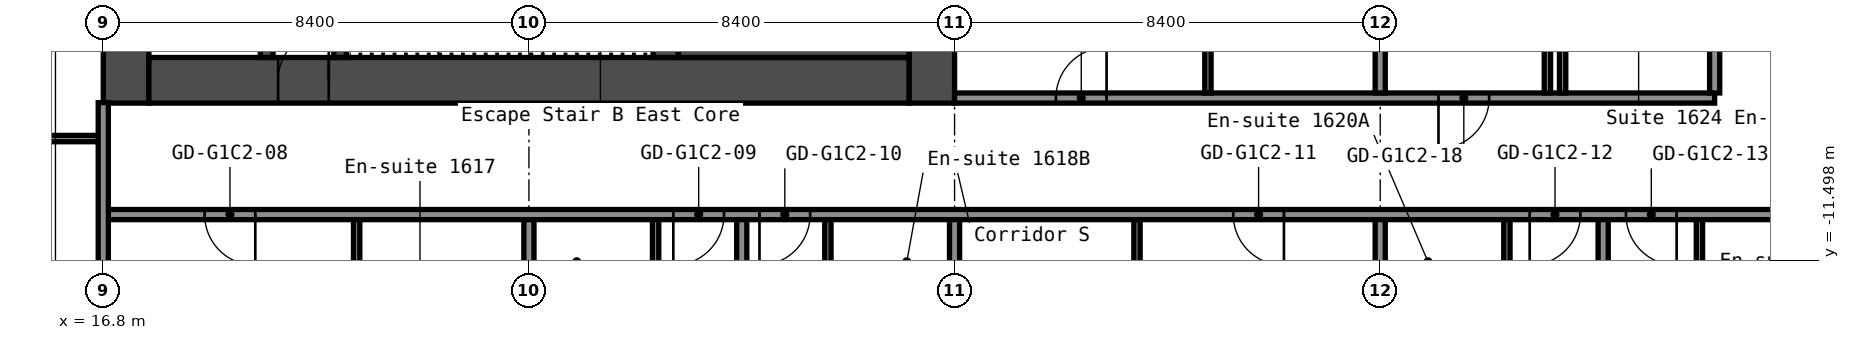
"""IFC4 building model, lengths in metres.
Left out: names, types, materials, properties, quantities, classifications, styles, units other than length and angle.
Written with IfcOpenShell. Run it as: python <this file> out.ifc"""

import sys

from ifc_helpers import new_model, si_unit, direction, frame, frame_2d, origin, place, context, subcontext, project, spatial, rectangle, extrude, element, fill, save


model = new_model("IFC4")
c1 = context("Model", 3, precision=1e-05, world=origin(), true_north=direction((0.0, 1.0)))
c2 = subcontext(c1, "Body", "Model", "MODEL_VIEW")
j1 = project(units=[si_unit("LENGTHUNIT", "METRE"), si_unit("PLANEANGLEUNIT", "RADIAN")], contexts=[c1])
p1 = place(None, origin())
s1 = spatial("IfcSite", under=j1, at=p1, CompositionType="ELEMENT")
p2 = place(p1, origin())
s2 = spatial("IfcBuilding", under=s1, at=p2, CompositionType="ELEMENT")
p3 = place(p2, frame((0.0, 0.0, 58.2)))
s3 = spatial("IfcBuildingStorey", under=s2, at=p3, CompositionType="ELEMENT", Elevation=58.2)
p4 = place(p3, frame((17.25, -8.4, 0.0), z_axis=(0.0, 0.0, 1.0), x_axis=(0.0, 1.0, 0.0)))
e1 = element("IfcWall", 1, at=p4, inside=s3, PredefinedType="SHEAR", context=c2, shape_type="SweptSolid", body=[
    extrude(rectangle(XDim=16.8, YDim=0.9, at=frame_2d((8.4, 0.0))), origin(), (0.0, 0.0, 1.0), 2.8),
])
p5 = place(p4, frame((12.75, 0.0, 0.0)))
e2 = element("IfcOpeningElement", 2, at=p5, cuts=e1, PredefinedType="OPENING", context=c2, shape_type="SweptSolid", body=[
    extrude(rectangle(XDim=1.2, YDim=2.1, at=frame_2d((0.6, 1.05))), frame((0.0, 0.46, 0.0), z_axis=(0.0, -1.0, 0.0), x_axis=(1.0, 0.0, 0.0)), (0.0, 0.0, 1.0), 0.92),
])
p6 = place(p4, frame((2.85, 0.0, 0.0)))
e3 = element("IfcOpeningElement", 3, at=p6, cuts=e1, PredefinedType="OPENING", context=c2, shape_type="SweptSolid", body=[
    extrude(rectangle(XDim=1.2, YDim=2.1, at=frame_2d((0.6, 1.05))), frame((0.0, 0.46, 0.0), z_axis=(0.0, -1.0, 0.0), x_axis=(1.0, 0.0, 0.0)), (0.0, 0.0, 1.0), 0.92),
])
p7 = place(p3, frame((33.15, -8.4, 0.0), z_axis=(0.0, 0.0, 1.0), x_axis=(0.0, 1.0, 0.0)))
e4 = element("IfcWall", 4, at=p7, inside=s3, PredefinedType="SHEAR", context=c2, shape_type="SweptSolid", body=[
    extrude(rectangle(XDim=16.8, YDim=0.9, at=frame_2d((8.4, 0.0))), origin(), (0.0, 0.0, 1.0), 2.8),
])
p8 = place(p3, frame((17.7, -7.95, 0.0), z_axis=(0.0, 0.0, 1.0), x_axis=(1.0, 0.0, 0.0)))
e5 = element("IfcWall", 5, at=p8, inside=s3, PredefinedType="SHEAR", context=c2, shape_type="SweptSolid", body=[
    extrude(rectangle(XDim=15.0, YDim=0.9, at=frame_2d((7.5, 0.0))), origin(), (0.0, 0.0, 1.0), 2.8),
])
p9 = place(p8, frame((2.55, 0.0, 0.0)))
e6 = element("IfcOpeningElement", 6, at=p9, cuts=e5, PredefinedType="OPENING", context=c2, shape_type="SweptSolid", body=[
    extrude(rectangle(XDim=1.0, YDim=2.1, at=frame_2d((0.5, 1.05))), frame((0.0, 0.46, 0.0), z_axis=(0.0, -1.0, 0.0), x_axis=(1.0, 0.0, 0.0)), (0.0, 0.0, 1.0), 0.92),
])
p10 = place(p3, frame((20.025, -7.5, 0.0), z_axis=(0.0, 0.0, 1.0), x_axis=(0.0, 1.0, 0.0)))
e7 = element("IfcWall", 7, at=p10, inside=s3, PredefinedType="SHEAR", context=c2, shape_type="SweptSolid", body=[
    extrude(rectangle(XDim=6.3, YDim=0.25, at=frame_2d((3.15, 0.0))), origin(), (0.0, 0.0, 1.0), 2.8),
])
p11 = place(p10, frame((2.4, 0.0, 0.0)))
e8 = element("IfcOpeningElement", 8, at=p11, cuts=e7, PredefinedType="OPENING", context=c2, shape_type="SweptSolid", body=[
    extrude(rectangle(XDim=1.0, YDim=2.1, at=frame_2d((0.5, 1.05))), frame((0.0, 0.135, 0.0), z_axis=(0.0, -1.0, 0.0), x_axis=(1.0, 0.0, 0.0)), (0.0, 0.0, 1.0), 0.27),
])
p12 = place(p3, frame((21.475, -7.5, 0.0), z_axis=(0.0, 0.0, 1.0), x_axis=(0.0, 1.0, 0.0)))
e9 = element("IfcWall", 9, at=p12, inside=s3, PredefinedType="SHEAR", context=c2, shape_type="SweptSolid", body=[
    extrude(rectangle(XDim=3.75, YDim=0.25, at=frame_2d((1.875, 0.0))), origin(), (0.0, 0.0, 1.0), 2.8),
])
p13 = place(p12, frame((1.3, 0.0, 0.0)))
e10 = element("IfcOpeningElement", 10, at=p13, cuts=e9, PredefinedType="OPENING", context=c2, shape_type="SweptSolid", body=[
    extrude(rectangle(XDim=1.2, YDim=2.1, at=frame_2d((0.6, 1.05))), frame((0.0, 0.135, 0.0), z_axis=(0.0, -1.0, 0.0), x_axis=(1.0, 0.0, 0.0)), (0.0, 0.0, 1.0), 0.27),
])
p14 = place(p3, frame((27.9, -7.5, 0.0), z_axis=(0.0, 0.0, 1.0), x_axis=(0.0, 1.0, 0.0)))
e11 = element("IfcWall", 11, at=p14, inside=s3, PredefinedType="SHEAR", context=c2, shape_type="SweptSolid", body=[
    extrude(rectangle(XDim=3.75, YDim=0.5, at=frame_2d((1.875, 0.0))), origin(), (0.0, 0.0, 1.0), 2.8),
])
p15 = place(p3, frame((28.15, -6.75, 0.0), z_axis=(0.0, 0.0, 1.0), x_axis=(1.0, 0.0, 0.0)))
e12 = element("IfcWall", 12, at=p15, inside=s3, PredefinedType="SHEAR", context=c2, shape_type="SweptSolid", body=[
    extrude(rectangle(XDim=4.55, YDim=1.5, at=frame_2d((2.275, 0.0))), origin(), (0.0, 0.0, 1.0), 2.8),
])
p16 = place(p3, frame((16.8, -10.6, 0.0), z_axis=(0.0, 0.0, 1.0), x_axis=(1.0, 0.0, 0.0)))
e13 = element("IfcWall", 13, at=p16, inside=s3, PredefinedType="PARTITIONING", context=c2, shape_type="SweptSolid", body=[
    extrude(rectangle(XDim=34.3, YDim=0.2, at=frame_2d((17.15, 0.0))), origin(), (0.0, 0.0, 1.0), 2.8),
])
p17 = place(p16, frame((2.0, 0.0, 0.0)))
e14 = element("IfcOpeningElement", 14, at=p17, cuts=e13, PredefinedType="OPENING", context=c2, shape_type="SweptSolid", body=[
    extrude(rectangle(XDim=1.0, YDim=2.1, at=frame_2d((0.5, 1.05))), frame((0.0, 0.11, 0.0), z_axis=(0.0, -1.0, 0.0), x_axis=(1.0, 0.0, 0.0)), (0.0, 0.0, 1.0), 0.22),
])
p18 = place(p16, frame((11.25, 0.0, 0.0)))
e15 = element("IfcOpeningElement", 15, at=p18, cuts=e13, PredefinedType="OPENING", context=c2, shape_type="SweptSolid", body=[
    extrude(rectangle(XDim=1.0, YDim=2.1, at=frame_2d((0.5, 1.05))), frame((0.0, 0.11, 0.0), z_axis=(0.0, -1.0, 0.0), x_axis=(1.0, 0.0, 0.0)), (0.0, 0.0, 1.0), 0.22),
])
p19 = place(p16, frame((12.95, 0.0, 0.0)))
e16 = element("IfcOpeningElement", 16, at=p19, cuts=e13, PredefinedType="OPENING", context=c2, shape_type="SweptSolid", body=[
    extrude(rectangle(XDim=1.0, YDim=2.1, at=frame_2d((0.5, 1.05))), frame((0.0, 0.11, 0.0), z_axis=(0.0, -1.0, 0.0), x_axis=(1.0, 0.0, 0.0)), (0.0, 0.0, 1.0), 0.22),
])
p20 = place(p16, frame((22.3, 0.0, 0.0)))
e17 = element("IfcOpeningElement", 17, at=p20, cuts=e13, PredefinedType="OPENING", context=c2, shape_type="SweptSolid", body=[
    extrude(rectangle(XDim=1.0, YDim=2.1, at=frame_2d((0.5, 1.05))), frame((0.0, 0.11, 0.0), z_axis=(0.0, -1.0, 0.0), x_axis=(1.0, 0.0, 0.0)), (0.0, 0.0, 1.0), 0.22),
])
p21 = place(p16, frame((28.15, 0.0, 0.0)))
e18 = element("IfcOpeningElement", 18, at=p21, cuts=e13, PredefinedType="OPENING", context=c2, shape_type="SweptSolid", body=[
    extrude(rectangle(XDim=1.0, YDim=2.1, at=frame_2d((0.5, 1.05))), frame((0.0, 0.11, 0.0), z_axis=(0.0, -1.0, 0.0), x_axis=(1.0, 0.0, 0.0)), (0.0, 0.0, 1.0), 0.22),
])
p22 = place(p16, frame((30.05, 0.0, 0.0)))
e19 = element("IfcOpeningElement", 19, at=p22, cuts=e13, PredefinedType="OPENING", context=c2, shape_type="SweptSolid", body=[
    extrude(rectangle(XDim=1.0, YDim=2.1, at=frame_2d((0.5, 1.05))), frame((0.0, 0.11, 0.0), z_axis=(0.0, -1.0, 0.0), x_axis=(1.0, 0.0, 0.0)), (0.0, 0.0, 1.0), 0.22),
])
p23 = place(p3, frame((14.363, -9.1, 0.0), z_axis=(0.0, 0.0, 1.0), x_axis=(1.0, 0.0, 0.0)))
e20 = element("IfcWall", 20, at=p23, inside=s3, PredefinedType="PARTITIONING", context=c2, shape_type="SweptSolid", body=[
    extrude(rectangle(XDim=2.337, YDim=0.125, at=frame_2d((1.169, 0.0))), origin(), (0.0, 0.0, 1.0), 2.8),
])
p24 = place(p3, frame((33.6, -8.3, 0.0), z_axis=(0.0, 0.0, 1.0), x_axis=(1.0, 0.0, 0.0)))
e21 = element("IfcWall", 21, at=p24, inside=s3, PredefinedType="PARTITIONING", context=c2, shape_type="SweptSolid", body=[
    extrude(rectangle(XDim=15.0, YDim=0.2, at=frame_2d((7.5, 0.0))), origin(), (0.0, 0.0, 1.0), 2.8),
])
p25 = place(p24, frame((2.0, 0.0, 0.0)))
e22 = element("IfcOpeningElement", 22, at=p25, cuts=e21, PredefinedType="OPENING", context=c2, shape_type="SweptSolid", body=[
    extrude(rectangle(XDim=1.0, YDim=2.1, at=frame_2d((0.5, 1.05))), frame((0.0, 0.11, 0.0), z_axis=(0.0, -1.0, 0.0), x_axis=(1.0, 0.0, 0.0)), (0.0, 0.0, 1.0), 0.22),
])
p26 = place(p24, frame((9.55, 0.0, 0.0)))
e23 = element("IfcOpeningElement", 23, at=p26, cuts=e21, PredefinedType="OPENING", context=c2, shape_type="SweptSolid", body=[
    extrude(rectangle(XDim=1.0, YDim=2.1, at=frame_2d((0.5, 1.05))), frame((0.0, 0.11, 0.0), z_axis=(0.0, -1.0, 0.0), x_axis=(1.0, 0.0, 0.0)), (0.0, 0.0, 1.0), 0.22),
])
p27 = place(p3, frame((16.8, -20.3, 0.0), z_axis=(0.0, 0.0, 1.0), x_axis=(0.0, 1.0, 0.0)))
e24 = element("IfcWall", 24, at=p27, inside=s3, PredefinedType="PARTITIONING", context=c2, shape_type="SweptSolid", body=[
    extrude(rectangle(XDim=11.91, YDim=0.2, at=frame_2d((5.955, 0.0))), origin(), (0.0, 0.0, 1.0), 2.8),
])
p28 = place(p3, frame((21.8, -14.0, 0.0), z_axis=(0.0, 0.0, 1.0), x_axis=(0.0, 1.0, 0.0)))
e25 = element("IfcWall", 25, at=p28, inside=s3, PredefinedType="PARTITIONING", context=c2, shape_type="SweptSolid", body=[
    extrude(rectangle(XDim=3.3, YDim=0.125, at=frame_2d((1.65, 0.0))), origin(), (0.0, 0.0, 1.0), 2.8),
])
p29 = place(p3, frame((25.2, -20.3, 0.0), z_axis=(0.0, 0.0, 1.0), x_axis=(0.0, 1.0, 0.0)))
e26 = element("IfcWall", 26, at=p29, inside=s3, PredefinedType="PARTITIONING", context=c2, shape_type="SweptSolid", body=[
    extrude(rectangle(XDim=9.6, YDim=0.2, at=frame_2d((4.8, 0.0))), origin(), (0.0, 0.0, 1.0), 2.8),
])
p30 = place(p3, frame((27.7, -13.6, 0.0), z_axis=(0.0, 0.0, 1.0), x_axis=(0.0, 1.0, 0.0)))
e27 = element("IfcWall", 27, at=p30, inside=s3, PredefinedType="PARTITIONING", context=c2, shape_type="SweptSolid", body=[
    extrude(rectangle(XDim=2.9, YDim=0.125, at=frame_2d((1.45, 0.0))), origin(), (0.0, 0.0, 1.0), 2.8),
])
p31 = place(p30, frame((0.6, 0.0, 0.0)))
e28 = element("IfcOpeningElement", 28, at=p31, cuts=e27, PredefinedType="OPENING", context=c2, shape_type="SweptSolid", body=[
    extrude(rectangle(XDim=0.8, YDim=2.1, at=frame_2d((0.4, 1.05))), frame((0.0, 0.073, 0.0), z_axis=(0.0, -1.0, 0.0), x_axis=(1.0, 0.0, 0.0)), (0.0, 0.0, 1.0), 0.145),
])
p32 = place(p3, frame((29.4, -20.3, 0.0), z_axis=(0.0, 0.0, 1.0), x_axis=(0.0, 1.0, 0.0)))
e29 = element("IfcWall", 29, at=p32, inside=s3, PredefinedType="PARTITIONING", context=c2, shape_type="SweptSolid", body=[
    extrude(rectangle(XDim=9.6, YDim=0.2, at=frame_2d((4.8, 0.0))), origin(), (0.0, 0.0, 1.0), 2.8),
])
p33 = place(p3, frame((31.1, -13.6, 0.0), z_axis=(0.0, 0.0, 1.0), x_axis=(0.0, 1.0, 0.0)))
e30 = element("IfcWall", 30, at=p33, inside=s3, PredefinedType="PARTITIONING", context=c2, shape_type="SweptSolid", body=[
    extrude(rectangle(XDim=2.9, YDim=0.125, at=frame_2d((1.45, 0.0))), origin(), (0.0, 0.0, 1.0), 2.8),
])
p34 = place(p33, frame((0.6, 0.0, 0.0)))
e31 = element("IfcOpeningElement", 31, at=p34, cuts=e30, PredefinedType="OPENING", context=c2, shape_type="SweptSolid", body=[
    extrude(rectangle(XDim=0.8, YDim=2.1, at=frame_2d((0.4, 1.05))), frame((0.0, 0.073, 0.0), z_axis=(0.0, -1.0, 0.0), x_axis=(1.0, 0.0, 0.0)), (0.0, 0.0, 1.0), 0.145),
])
p35 = place(p3, frame((33.6, -20.3, 0.0), z_axis=(0.0, 0.0, 1.0), x_axis=(0.0, 1.0, 0.0)))
e32 = element("IfcWall", 32, at=p35, inside=s3, PredefinedType="PARTITIONING", context=c2, shape_type="SweptSolid", body=[
    extrude(rectangle(XDim=9.6, YDim=0.2, at=frame_2d((4.8, 0.0))), origin(), (0.0, 0.0, 1.0), 2.8),
])
p36 = place(p3, frame((37.2, -14.0, 0.0), z_axis=(0.0, 0.0, 1.0), x_axis=(0.0, 1.0, 0.0)))
e33 = element("IfcWall", 33, at=p36, inside=s3, PredefinedType="PARTITIONING", context=c2, shape_type="SweptSolid", body=[
    extrude(rectangle(XDim=3.3, YDim=0.125, at=frame_2d((1.65, 0.0))), origin(), (0.0, 0.0, 1.0), 2.8),
])
p37 = place(p36, frame((1.2, 0.0, 0.0)))
e34 = element("IfcOpeningElement", 34, at=p37, cuts=e33, PredefinedType="OPENING", context=c2, shape_type="SweptSolid", body=[
    extrude(rectangle(XDim=1.0, YDim=2.1, at=frame_2d((0.5, 1.05))), frame((0.0, 0.073, 0.0), z_axis=(0.0, -1.0, 0.0), x_axis=(1.0, 0.0, 0.0)), (0.0, 0.0, 1.0), 0.145),
])
p38 = place(p3, frame((38.6, -8.2, 0.0), z_axis=(0.0, 0.0, 1.0), x_axis=(0.0, 1.0, 0.0)))
e35 = element("IfcWall", 35, at=p38, inside=s3, PredefinedType="PARTITIONING", context=c2, shape_type="SweptSolid", body=[
    extrude(rectangle(XDim=3.3, YDim=0.125, at=frame_2d((1.65, 0.0))), origin(), (0.0, 0.0, 1.0), 2.8),
])
p39 = place(p3, frame((42.0, -20.3, 0.0), z_axis=(0.0, 0.0, 1.0), x_axis=(0.0, 1.0, 0.0)))
e36 = element("IfcWall", 36, at=p39, inside=s3, PredefinedType="PARTITIONING", context=c2, shape_type="SweptSolid", body=[
    extrude(rectangle(XDim=9.6, YDim=0.2, at=frame_2d((4.8, 0.0))), origin(), (0.0, 0.0, 1.0), 2.8),
])
p40 = place(p3, frame((42.0, -8.2, 0.0), z_axis=(0.0, 0.0, 1.0), x_axis=(0.0, 1.0, 0.0)))
e37 = element("IfcWall", 37, at=p40, inside=s3, PredefinedType="PARTITIONING", context=c2, shape_type="SweptSolid", body=[
    extrude(rectangle(XDim=16.4, YDim=0.2, at=frame_2d((8.2, 0.0))), origin(), (0.0, 0.0, 1.0), 2.8),
])
p41 = place(p3, frame((44.5, -13.6, 0.0), z_axis=(0.0, 0.0, 1.0), x_axis=(0.0, 1.0, 0.0)))
e38 = element("IfcWall", 38, at=p41, inside=s3, PredefinedType="PARTITIONING", context=c2, shape_type="SweptSolid", body=[
    extrude(rectangle(XDim=2.9, YDim=0.125, at=frame_2d((1.45, 0.0))), origin(), (0.0, 0.0, 1.0), 2.8),
])
p42 = place(p41, frame((0.6, 0.0, 0.0)))
e39 = element("IfcOpeningElement", 39, at=p42, cuts=e38, PredefinedType="OPENING", context=c2, shape_type="SweptSolid", body=[
    extrude(rectangle(XDim=0.8, YDim=2.1, at=frame_2d((0.4, 1.05))), frame((0.0, 0.073, 0.0), z_axis=(0.0, -1.0, 0.0), x_axis=(1.0, 0.0, 0.0)), (0.0, 0.0, 1.0), 0.145),
])
p43 = place(p3, frame((45.3, -8.2, 0.0), z_axis=(0.0, 0.0, 1.0), x_axis=(0.0, 1.0, 0.0)))
e40 = element("IfcWall", 40, at=p43, inside=s3, PredefinedType="PARTITIONING", context=c2, shape_type="SweptSolid", body=[
    extrude(rectangle(XDim=8.1, YDim=0.125, at=frame_2d((4.05, 0.0))), origin(), (0.0, 0.0, 1.0), 2.8),
])
p44 = place(p43, frame((4.05, 0.0, 0.0)))
e41 = element("IfcOpeningElement", 41, at=p44, cuts=e40, PredefinedType="OPENING", context=c2, shape_type="SweptSolid", body=[
    extrude(rectangle(XDim=0.9, YDim=2.1, at=frame_2d((0.45, 1.05))), frame((0.0, 0.073, 0.0), z_axis=(0.0, -1.0, 0.0), x_axis=(1.0, 0.0, 0.0)), (0.0, 0.0, 1.0), 0.145),
])
p45 = place(p3, frame((45.6, -8.2, 0.0), z_axis=(0.0, 0.0, 1.0), x_axis=(0.0, 1.0, 0.0)))
e42 = element("IfcWall", 42, at=p45, inside=s3, PredefinedType="PARTITIONING", context=c2, shape_type="SweptSolid", body=[
    extrude(rectangle(XDim=3.1, YDim=0.125, at=frame_2d((1.55, 0.0))), origin(), (0.0, 0.0, 1.0), 2.8),
])
p46 = place(p3, frame((46.4, -20.3, 0.0), z_axis=(0.0, 0.0, 1.0), x_axis=(0.0, 1.0, 0.0)))
e43 = element("IfcWall", 43, at=p46, inside=s3, PredefinedType="PARTITIONING", context=c2, shape_type="SweptSolid", body=[
    extrude(rectangle(XDim=9.6, YDim=0.2, at=frame_2d((4.8, 0.0))), origin(), (0.0, 0.0, 1.0), 2.8),
])
p47 = place(p3, frame((48.3, -13.6, 0.0), z_axis=(0.0, 0.0, 1.0), x_axis=(0.0, 1.0, 0.0)))
e44 = element("IfcWall", 44, at=p47, inside=s3, PredefinedType="PARTITIONING", context=c2, shape_type="SweptSolid", body=[
    extrude(rectangle(XDim=2.9, YDim=0.125, at=frame_2d((1.45, 0.0))), origin(), (0.0, 0.0, 1.0), 2.8),
])
p48 = place(p47, frame((0.6, 0.0, 0.0)))
e45 = element("IfcOpeningElement", 45, at=p48, cuts=e44, PredefinedType="OPENING", context=c2, shape_type="SweptSolid", body=[
    extrude(rectangle(XDim=0.8, YDim=2.1, at=frame_2d((0.4, 1.05))), frame((0.0, 0.073, 0.0), z_axis=(0.0, -1.0, 0.0), x_axis=(1.0, 0.0, 0.0)), (0.0, 0.0, 1.0), 0.145),
])
p49 = place(p3, frame((48.6, -8.2, 0.0), z_axis=(0.0, 0.0, 1.0), x_axis=(0.0, 1.0, 0.0)))
e46 = element("IfcWall", 46, at=p49, inside=s3, PredefinedType="PARTITIONING", context=c2, shape_type="SweptSolid", body=[
    extrude(rectangle(XDim=16.4, YDim=0.2, at=frame_2d((8.2, 0.0))), origin(), (0.0, 0.0, 1.0), 2.8),
])
p50 = place(p9, origin())
e47 = element("IfcDoor", 47, at=p50, inside=s3, OperationType="SINGLE_SWING_LEFT", PredefinedType="DOOR", context=c2, shape_type="SweptSolid", body=[
    extrude(rectangle(XDim=1.0, YDim=2.1, at=frame_2d((0.5, 1.05))), frame((0.0, 0.025, 0.0), z_axis=(0.0, -1.0, 0.0), x_axis=(1.0, 0.0, 0.0)), (0.0, 0.0, 1.0), 0.05),
])
fill(e6, e47)
p51 = place(p17, origin())
e48 = element("IfcDoor", 48, at=p51, inside=s3, OperationType="SINGLE_SWING_RIGHT", PredefinedType="DOOR", context=c2, shape_type="SweptSolid", body=[
    extrude(rectangle(XDim=1.0, YDim=2.1, at=frame_2d((0.5, 1.05))), frame((0.0, 0.025, 0.0), z_axis=(0.0, -1.0, 0.0), x_axis=(1.0, 0.0, 0.0)), (0.0, 0.0, 1.0), 0.05),
])
fill(e14, e48)
p52 = place(p18, origin())
e49 = element("IfcDoor", 49, at=p52, inside=s3, OperationType="SINGLE_SWING_LEFT", PredefinedType="DOOR", context=c2, shape_type="SweptSolid", body=[
    extrude(rectangle(XDim=1.0, YDim=2.1, at=frame_2d((0.5, 1.05))), frame((0.0, 0.025, 0.0), z_axis=(0.0, -1.0, 0.0), x_axis=(1.0, 0.0, 0.0)), (0.0, 0.0, 1.0), 0.05),
])
fill(e15, e49)
p53 = place(p19, origin())
e50 = element("IfcDoor", 50, at=p53, inside=s3, OperationType="SINGLE_SWING_LEFT", PredefinedType="DOOR", context=c2, shape_type="SweptSolid", body=[
    extrude(rectangle(XDim=1.0, YDim=2.1, at=frame_2d((0.5, 1.05))), frame((0.0, 0.025, 0.0), z_axis=(0.0, -1.0, 0.0), x_axis=(1.0, 0.0, 0.0)), (0.0, 0.0, 1.0), 0.05),
])
fill(e16, e50)
p54 = place(p20, origin())
e51 = element("IfcDoor", 51, at=p54, inside=s3, OperationType="SINGLE_SWING_RIGHT", PredefinedType="DOOR", context=c2, shape_type="SweptSolid", body=[
    extrude(rectangle(XDim=1.0, YDim=2.1, at=frame_2d((0.5, 1.05))), frame((0.0, 0.025, 0.0), z_axis=(0.0, -1.0, 0.0), x_axis=(1.0, 0.0, 0.0)), (0.0, 0.0, 1.0), 0.05),
])
fill(e17, e51)
p55 = place(p21, origin())
e52 = element("IfcDoor", 52, at=p55, inside=s3, OperationType="SINGLE_SWING_LEFT", PredefinedType="DOOR", context=c2, shape_type="SweptSolid", body=[
    extrude(rectangle(XDim=1.0, YDim=2.1, at=frame_2d((0.5, 1.05))), frame((0.0, 0.025, 0.0), z_axis=(0.0, -1.0, 0.0), x_axis=(1.0, 0.0, 0.0)), (0.0, 0.0, 1.0), 0.05),
])
fill(e18, e52)
p56 = place(p22, origin())
e53 = element("IfcDoor", 53, at=p56, inside=s3, OperationType="SINGLE_SWING_RIGHT", PredefinedType="DOOR", context=c2, shape_type="SweptSolid", body=[
    extrude(rectangle(XDim=1.0, YDim=2.1, at=frame_2d((0.5, 1.05))), frame((0.0, 0.025, 0.0), z_axis=(0.0, -1.0, 0.0), x_axis=(1.0, 0.0, 0.0)), (0.0, 0.0, 1.0), 0.05),
])
fill(e19, e53)
p57 = place(p25, origin())
e54 = element("IfcDoor", 54, at=p57, inside=s3, OperationType="SINGLE_SWING_LEFT", PredefinedType="DOOR", context=c2, shape_type="SweptSolid", body=[
    extrude(rectangle(XDim=1.0, YDim=2.1, at=frame_2d((0.5, 1.05))), frame((0.0, 0.025, 0.0), z_axis=(0.0, -1.0, 0.0), x_axis=(1.0, 0.0, 0.0)), (0.0, 0.0, 1.0), 0.05),
])
fill(e22, e54)
p58 = place(p26, origin())
e55 = element("IfcDoor", 55, at=p58, inside=s3, OperationType="SINGLE_SWING_LEFT", PredefinedType="DOOR", context=c2, shape_type="SweptSolid", body=[
    extrude(rectangle(XDim=1.0, YDim=2.1, at=frame_2d((0.5, 1.05))), frame((0.0, 0.025, 0.0), z_axis=(0.0, -1.0, 0.0), x_axis=(1.0, 0.0, 0.0)), (0.0, 0.0, 1.0), 0.05),
])
fill(e23, e55)
save(model, sys.argv[1])
